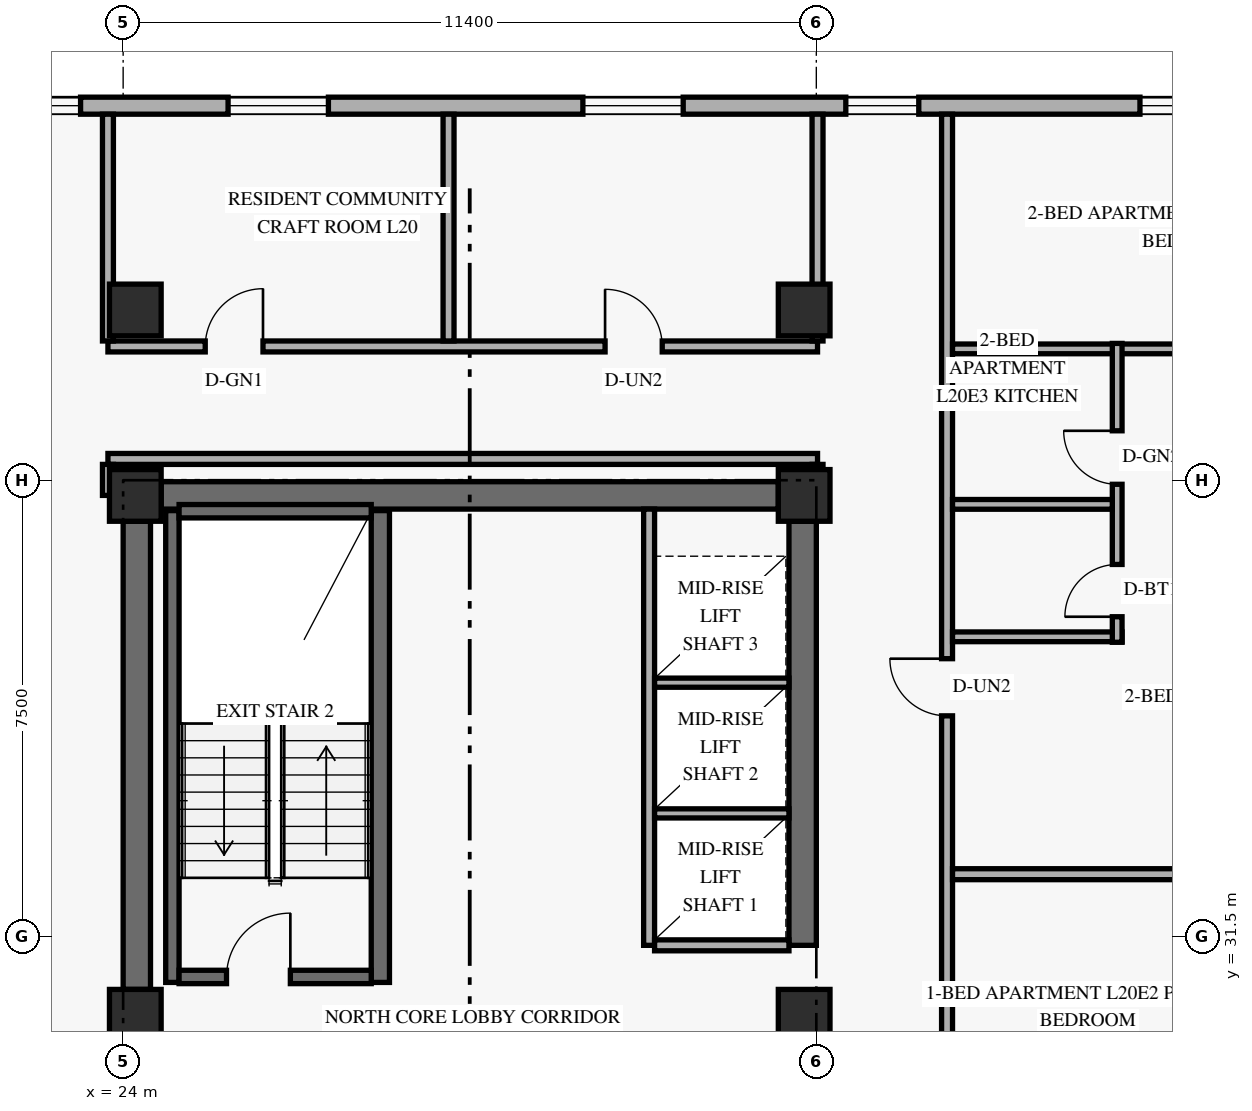
"""IFC4 building model, lengths in metres.
Left out: names, types, materials, properties, quantities, classifications, styles, units other than length and angle.
Written with IfcOpenShell. Run it as: python <this file> out.ifc"""

import sys

from ifc_helpers import new_model, si_unit, direction, frame, frame_2d, origin, origin_2d, place, context, subcontext, project, spatial, rectangle, extrude, element, fill, save


model = new_model("IFC4")
c1 = context("Model", 3, precision=1e-05, world=origin(), true_north=direction((0.0, 1.0)))
c2 = subcontext(c1, "Body", "Model", "MODEL_VIEW")
j1 = project(units=[si_unit("LENGTHUNIT", "METRE"), si_unit("PLANEANGLEUNIT", "RADIAN")], contexts=[c1])
p1 = place(None, origin())
s1 = spatial("IfcSite", under=j1, at=p1, CompositionType="ELEMENT")
p2 = place(p1, origin())
s2 = spatial("IfcBuilding", under=s1, at=p2, CompositionType="ELEMENT")
p3 = place(p2, frame((0.0, 0.0, 80.4)))
s3 = spatial("IfcBuildingStorey", under=s2, at=p3, CompositionType="ELEMENT", Elevation=80.4)
p4 = place(p3, frame((24.225, 30.625, 0.0), z_axis=(0.0, 0.0, 1.0), x_axis=(0.0, 1.0, 0.0)))
e1 = element("IfcWall", 1, at=p4, inside=s3, PredefinedType="SHEAR", context=c2, shape_type="SweptSolid", body=[
    extrude(rectangle(XDim=7.7, YDim=0.45, at=frame_2d((3.85, 0.0))), origin(), (0.0, 0.0, 1.0), 2.749),
])
p5 = place(p3, frame((35.175, 31.35, 0.0), z_axis=(0.0, 0.0, 1.0), x_axis=(0.0, 1.0, 0.0)))
e2 = element("IfcWall", 2, at=p5, inside=s3, PredefinedType="SHEAR", context=c2, shape_type="SweptSolid", body=[
    extrude(rectangle(XDim=6.975, YDim=0.45, at=frame_2d((3.487, 0.0))), origin(), (0.0, 0.0, 1.0), 2.749),
])
p6 = place(p3, frame((24.625, 38.75, 0.0), z_axis=(0.0, 0.0, 1.0), x_axis=(1.0, 0.0, 0.0)))
e3 = element("IfcWall", 3, at=p6, inside=s3, PredefinedType="SHEAR", context=c2, shape_type="SweptSolid", body=[
    extrude(rectangle(XDim=10.15, YDim=0.45, at=frame_2d((5.075, 0.0))), origin(), (0.0, 0.0, 1.0), 3.36),
])
p7 = place(p3, frame((24.81, 30.74, 0.0), z_axis=(0.0, 0.0, 1.0), x_axis=(0.0, 1.0, 0.0)))
e4 = element("IfcWall", 4, at=p7, inside=s3, PredefinedType="SHEAR", context=c2, shape_type="SweptSolid", body=[
    extrude(rectangle(XDim=7.76, YDim=0.22, at=frame_2d((3.88, 0.0))), origin(), (0.0, 0.0, 1.0), 3.36),
])
p8 = place(p3, frame((28.23, 30.74, 0.0), z_axis=(0.0, 0.0, 1.0), x_axis=(0.0, 1.0, 0.0)))
e5 = element("IfcWall", 5, at=p8, inside=s3, PredefinedType="SHEAR", context=c2, shape_type="SweptSolid", body=[
    extrude(rectangle(XDim=7.76, YDim=0.3, at=frame_2d((3.88, 0.0))), origin(), (0.0, 0.0, 1.0), 3.36),
])
p9 = place(p3, frame((24.92, 30.83, 0.0), z_axis=(0.0, 0.0, 1.0), x_axis=(1.0, 0.0, 0.0)))
e6 = element("IfcWall", 6, at=p9, inside=s3, PredefinedType="SHEAR", context=c2, shape_type="SweptSolid", body=[
    extrude(rectangle(XDim=3.16, YDim=0.22, at=frame_2d((1.58, 0.0))), origin(), (0.0, 0.0, 1.0), 3.36),
])
p10 = place(p9, frame((0.78, 0.0, 0.0)))
e7 = element("IfcOpeningElement", 7, at=p10, cuts=e6, PredefinedType="OPENING", context=c2, shape_type="SweptSolid", body=[
    extrude(rectangle(XDim=1.05, YDim=2.15, at=frame_2d((0.525, 1.075))), frame((0.0, 0.12, 0.0), z_axis=(0.0, -1.0, 0.0), x_axis=(1.0, 0.0, 0.0)), (0.0, 0.0, 1.0), 0.24),
])
p11 = place(p3, frame((24.92, 38.49, 0.0), z_axis=(0.0, 0.0, 1.0), x_axis=(1.0, 0.0, 0.0)))
e8 = element("IfcWall", 8, at=p11, inside=s3, PredefinedType="SHEAR", context=c2, shape_type="SweptSolid", body=[
    extrude(rectangle(XDim=3.16, YDim=0.22, at=frame_2d((1.58, 0.0))), origin(), (0.0, 0.0, 1.0), 3.36),
])
for number, where, z_axis, x_axis in (
    (9, (24.2, 30.2, 0.0), (0.0, 0.0, 1.0), (1.0, 0.0, 0.0)),
    (10, (24.2, 38.75, 0.0), (0.0, 0.0, 1.0), (1.0, 0.0, 0.0)),
    (11, (24.2, 41.8, 0.0), (0.0, 0.0, 1.0), (1.0, 0.0, 0.0)),
    (12, (35.2, 30.2, 0.0), (0.0, 0.0, 1.0), (1.0, 0.0, 0.0)),
    (13, (35.2, 38.75, 0.0), (0.0, 0.0, 1.0), (1.0, 0.0, 0.0)),
    (14, (35.2, 41.8, 0.0), (0.0, 0.0, 1.0), (1.0, 0.0, 0.0)),
):
    element("IfcColumn", number, at=place(p3, frame(where, z_axis=z_axis, x_axis=x_axis)), inside=s3, PredefinedType="COLUMN", context=c2, shape_type="SweptSolid", body=[
        extrude(rectangle(XDim=0.85, YDim=0.85, at=origin_2d()), origin(), (0.0, 0.0, 1.0), 3.6),
    ])
p12 = place(p3, frame((49.98, 45.16, 0.0), z_axis=(0.0, 0.0, 1.0), x_axis=(-1.0, 0.0, 0.0)))
e15 = element("IfcWall", 15, at=p12, inside=s3, PredefinedType="SOLIDWALL", context=c2, shape_type="SweptSolid", body=[
    extrude(rectangle(XDim=36.56, YDim=0.28, at=frame_2d((18.28, 0.0))), origin(), (0.0, 0.0, 1.0), 3.36),
])
p13 = place(p12, frame((30.99, 0.0, 0.85)))
e16 = element("IfcOpeningElement", 16, at=p13, cuts=e15, PredefinedType="OPENING", context=c2, shape_type="SweptSolid", body=[
    extrude(rectangle(XDim=1.65, YDim=1.6, at=frame_2d((0.825, 0.8))), frame((0.0, 0.15, 0.0), z_axis=(0.0, -1.0, 0.0), x_axis=(1.0, 0.0, 0.0)), (0.0, 0.0, 1.0), 0.3),
])
p14 = place(p12, frame((26.68, 0.0, 0.85)))
e17 = element("IfcOpeningElement", 17, at=p14, cuts=e15, PredefinedType="OPENING", context=c2, shape_type="SweptSolid", body=[
    extrude(rectangle(XDim=1.2, YDim=1.5, at=frame_2d((0.6, 0.75))), frame((0.0, 0.15, 0.0), z_axis=(0.0, -1.0, 0.0), x_axis=(1.0, 0.0, 0.0)), (0.0, 0.0, 1.0), 0.3),
])
p15 = place(p12, frame((22.604, 0.0, 0.85)))
e18 = element("IfcOpeningElement", 18, at=p15, cuts=e15, PredefinedType="OPENING", context=c2, shape_type="SweptSolid", body=[
    extrude(rectangle(XDim=1.65, YDim=1.6, at=frame_2d((0.825, 0.8))), frame((0.0, 0.15, 0.0), z_axis=(0.0, -1.0, 0.0), x_axis=(1.0, 0.0, 0.0)), (0.0, 0.0, 1.0), 0.3),
])
p16 = place(p12, frame((16.769, 0.0, 0.85)))
e19 = element("IfcOpeningElement", 19, at=p16, cuts=e15, PredefinedType="OPENING", context=c2, shape_type="SweptSolid", body=[
    extrude(rectangle(XDim=1.65, YDim=1.6, at=frame_2d((0.825, 0.8))), frame((0.0, 0.15, 0.0), z_axis=(0.0, -1.0, 0.0), x_axis=(1.0, 0.0, 0.0)), (0.0, 0.0, 1.0), 0.3),
])
p17 = place(p12, frame((12.895, 0.0, 0.85)))
e20 = element("IfcOpeningElement", 20, at=p17, cuts=e15, PredefinedType="OPENING", context=c2, shape_type="SweptSolid", body=[
    extrude(rectangle(XDim=1.2, YDim=1.5, at=frame_2d((0.6, 0.75))), frame((0.0, 0.15, 0.0), z_axis=(0.0, -1.0, 0.0), x_axis=(1.0, 0.0, 0.0)), (0.0, 0.0, 1.0), 0.3),
])
p18 = place(p12, frame((7.607, 0.0, 0.85)))
e21 = element("IfcOpeningElement", 21, at=p18, cuts=e15, PredefinedType="OPENING", context=c2, shape_type="SweptSolid", body=[
    extrude(rectangle(XDim=1.65, YDim=1.6, at=frame_2d((0.825, 0.8))), frame((0.0, 0.15, 0.0), z_axis=(0.0, -1.0, 0.0), x_axis=(1.0, 0.0, 0.0)), (0.0, 0.0, 1.0), 0.3),
])
p19 = place(p12, frame((1.393, 0.0, 0.85)))
e22 = element("IfcOpeningElement", 22, at=p19, cuts=e15, PredefinedType="OPENING", context=c2, shape_type="SweptSolid", body=[
    extrude(rectangle(XDim=1.65, YDim=1.6, at=frame_2d((0.825, 0.8))), frame((0.0, 0.15, 0.0), z_axis=(0.0, -1.0, 0.0), x_axis=(1.0, 0.0, 0.0)), (0.0, 0.0, 1.0), 0.3),
])
p20 = place(p3, frame((32.65, 31.35, 0.0), z_axis=(0.0, 0.0, 1.0), x_axis=(0.0, 1.0, 0.0)))
e23 = element("IfcWall", 23, at=p20, inside=s3, PredefinedType="STANDARD", context=c2, shape_type="SweptSolid", body=[
    extrude(rectangle(XDim=7.175, YDim=0.18, at=frame_2d((3.587, 0.0))), origin(), (0.0, 0.0, 1.0), 3.36),
])
p21 = place(p3, frame((32.74, 31.35, 0.0), z_axis=(0.0, 0.0, 1.0), x_axis=(1.0, 0.0, 0.0)))
e24 = element("IfcWall", 24, at=p21, inside=s3, PredefinedType="STANDARD", context=c2, shape_type="SweptSolid", body=[
    extrude(rectangle(XDim=2.21, YDim=0.18, at=frame_2d((1.105, 0.0))), origin(), (0.0, 0.0, 1.0), 3.36),
])
for number, where, z_axis, x_axis in (
    (25, (32.74, 33.52, 0.0), (0.0, 0.0, 1.0), (1.0, 0.0, 0.0)),
    (26, (32.74, 35.67, 0.0), (0.0, 0.0, 1.0), (1.0, 0.0, 0.0)),
):
    element("IfcWall", number, at=place(p3, frame(where, z_axis=z_axis, x_axis=x_axis)), inside=s3, PredefinedType="STANDARD", context=c2, shape_type="SweptSolid", body=[
        extrude(rectangle(XDim=2.21, YDim=0.15, at=frame_2d((1.105, 0.0))), origin(), (0.0, 0.0, 1.0), 3.36),
    ])
p22 = place(p3, frame((37.55, 2.98, 0.0), z_axis=(0.0, 0.0, 1.0), x_axis=(0.0, 1.0, 0.0)))
e27 = element("IfcWall", 27, at=p22, inside=s3, PredefinedType="STANDARD", context=c2, shape_type="SweptSolid", body=[
    extrude(rectangle(XDim=42.04, YDim=0.18, at=frame_2d((21.02, 0.0))), origin(), (0.0, 0.0, 1.0), 2.731),
])
p23 = place(p22, frame((8.69, 0.0, 0.0)))
e28 = element("IfcOpeningElement", 28, at=p23, cuts=e27, PredefinedType="OPENING", context=c2, shape_type="SweptSolid", body=[
    extrude(rectangle(XDim=0.94, YDim=2.15, at=frame_2d((0.47, 1.075))), frame((0.0, 0.1, 0.0), z_axis=(0.0, -1.0, 0.0), x_axis=(1.0, 0.0, 0.0)), (0.0, 0.0, 1.0), 0.2),
])
p24 = place(p22, frame((19.043, 0.0, 0.0)))
e29 = element("IfcOpeningElement", 29, at=p24, cuts=e27, PredefinedType="OPENING", context=c2, shape_type="SweptSolid", body=[
    extrude(rectangle(XDim=0.94, YDim=2.15, at=frame_2d((0.47, 1.075))), frame((0.0, 0.1, 0.0), z_axis=(0.0, -1.0, 0.0), x_axis=(1.0, 0.0, 0.0)), (0.0, 0.0, 1.0), 0.2),
])
p25 = place(p22, frame((32.145, 0.0, 0.0)))
e30 = element("IfcOpeningElement", 30, at=p25, cuts=e27, PredefinedType="OPENING", context=c2, shape_type="SweptSolid", body=[
    extrude(rectangle(XDim=0.94, YDim=2.15, at=frame_2d((0.47, 1.075))), frame((0.0, 0.1, 0.0), z_axis=(0.0, -1.0, 0.0), x_axis=(1.0, 0.0, 0.0)), (0.0, 0.0, 1.0), 0.2),
])
p26 = place(p3, frame((23.75, 41.2, 0.0), z_axis=(0.0, 0.0, 1.0), x_axis=(1.0, 0.0, 0.0)))
e31 = element("IfcWall", 31, at=p26, inside=s3, PredefinedType="STANDARD", context=c2, shape_type="SweptSolid", body=[
    extrude(rectangle(XDim=11.67, YDim=0.18, at=frame_2d((5.835, 0.0))), origin(), (0.0, 0.0, 1.0), 2.731),
])
p27 = place(p26, frame((1.6, 0.0, 0.0)))
e32 = element("IfcOpeningElement", 32, at=p27, cuts=e31, PredefinedType="OPENING", context=c2, shape_type="SweptSolid", body=[
    extrude(rectangle(XDim=0.95, YDim=2.15, at=frame_2d((0.475, 1.075))), frame((0.0, 0.1, 0.0), z_axis=(0.0, -1.0, 0.0), x_axis=(1.0, 0.0, 0.0)), (0.0, 0.0, 1.0), 0.2),
])
p28 = place(p26, frame((8.176, 0.0, 0.0)))
e33 = element("IfcOpeningElement", 33, at=p28, cuts=e31, PredefinedType="OPENING", context=c2, shape_type="SweptSolid", body=[
    extrude(rectangle(XDim=0.94, YDim=2.15, at=frame_2d((0.47, 1.075))), frame((0.0, 0.1, 0.0), z_axis=(0.0, -1.0, 0.0), x_axis=(1.0, 0.0, 0.0)), (0.0, 0.0, 1.0), 0.2),
])
p29 = place(p3, frame((23.75, 39.35, 0.0), z_axis=(0.0, 0.0, 1.0), x_axis=(1.0, 0.0, 0.0)))
e34 = element("IfcWall", 34, at=p29, inside=s3, PredefinedType="STANDARD", context=c2, shape_type="SweptSolid", body=[
    extrude(rectangle(XDim=11.67, YDim=0.18, at=frame_2d((5.835, 0.0))), origin(), (0.0, 0.0, 1.0), 2.731),
])
p30 = place(p3, frame((35.42, 38.75, 0.0), z_axis=(0.0, 0.0, 1.0), x_axis=(0.0, 1.0, 0.0)))
e35 = element("IfcWall", 35, at=p30, inside=s3, PredefinedType="STANDARD", context=c2, shape_type="SweptSolid", body=[
    extrude(rectangle(XDim=0.51, YDim=0.18, at=frame_2d((0.255, 0.0))), origin(), (0.0, 0.0, 1.0), 2.731),
])
p31 = place(p3, frame((35.42, 41.29, 0.0), z_axis=(0.0, 0.0, 1.0), x_axis=(0.0, 1.0, 0.0)))
e36 = element("IfcWall", 36, at=p31, inside=s3, PredefinedType="PARTITIONING", context=c2, shape_type="SweptSolid", body=[
    extrude(rectangle(XDim=3.73, YDim=0.18, at=frame_2d((1.865, 0.0))), origin(), (0.0, 0.0, 1.0), 2.731),
])
p32 = place(p3, frame((23.75, 38.75, 0.0), z_axis=(0.0, 0.0, 1.0), x_axis=(0.0, 1.0, 0.0)))
e37 = element("IfcWall", 37, at=p32, inside=s3, PredefinedType="STANDARD", context=c2, shape_type="SweptSolid", body=[
    extrude(rectangle(XDim=0.51, YDim=0.18, at=frame_2d((0.255, 0.0))), origin(), (0.0, 0.0, 1.0), 2.731),
])
p33 = place(p3, frame((37.64, 32.52, 0.0), z_axis=(0.0, 0.0, 1.0), x_axis=(1.0, 0.0, 0.0)))
e38 = element("IfcWall", 38, at=p33, inside=s3, PredefinedType="PARTITIONING", context=c2, shape_type="SweptSolid", body=[
    extrude(rectangle(XDim=15.68, YDim=0.18, at=frame_2d((7.84, 0.0))), origin(), (0.0, 0.0, 1.0), 2.731),
])
p34 = place(p3, frame((37.64, 41.16, 0.0), z_axis=(0.0, 0.0, 1.0), x_axis=(1.0, 0.0, 0.0)))
e39 = element("IfcWall", 39, at=p34, inside=s3, PredefinedType="PARTITIONING", context=c2, shape_type="SweptSolid", body=[
    extrude(rectangle(XDim=15.68, YDim=0.16, at=frame_2d((7.84, 0.0))), origin(), (0.0, 0.0, 1.0), 2.731),
])
p35 = place(p34, frame((5.751, 0.0, 0.0)))
e40 = element("IfcOpeningElement", 40, at=p35, cuts=e39, PredefinedType="OPENING", context=c2, shape_type="SweptSolid", body=[
    extrude(rectangle(XDim=0.88, YDim=2.14, at=frame_2d((0.44, 1.07))), frame((0.0, 0.09, 0.0), z_axis=(0.0, -1.0, 0.0), x_axis=(1.0, 0.0, 0.0)), (0.0, 0.0, 1.0), 0.18),
])
p36 = place(p34, frame((8.244, 0.0, 0.0)))
e41 = element("IfcOpeningElement", 41, at=p36, cuts=e39, PredefinedType="OPENING", context=c2, shape_type="SweptSolid", body=[
    extrude(rectangle(XDim=0.88, YDim=2.14, at=frame_2d((0.44, 1.07))), frame((0.0, 0.09, 0.0), z_axis=(0.0, -1.0, 0.0), x_axis=(1.0, 0.0, 0.0)), (0.0, 0.0, 1.0), 0.18),
])
p37 = place(p3, frame((37.64, 36.425, 0.0), z_axis=(0.0, 0.0, 1.0), x_axis=(1.0, 0.0, 0.0)))
e42 = element("IfcWall", 42, at=p37, inside=s3, PredefinedType="PLUMBINGWALL", context=c2, shape_type="SweptSolid", body=[
    extrude(rectangle(XDim=2.788, YDim=0.16, at=frame_2d((1.394, 0.0))), origin(), (0.0, 0.0, 1.0), 3.36),
])
p38 = place(p3, frame((40.348, 36.334, 0.0), z_axis=(0.0, 0.0, 1.0), x_axis=(0.0, 1.0, 0.0)))
e43 = element("IfcWall", 43, at=p38, inside=s3, PredefinedType="PLUMBINGWALL", context=c2, shape_type="SweptSolid", body=[
    extrude(rectangle(XDim=4.916, YDim=0.16, at=frame_2d((2.458, 0.0))), origin(), (0.0, 0.0, 1.0), 2.731),
])
p39 = place(p38, frame((0.42, 0.0, 0.0)))
e44 = element("IfcOpeningElement", 44, at=p39, cuts=e43, PredefinedType="OPENING", context=c2, shape_type="SweptSolid", body=[
    extrude(rectangle(XDim=0.86, YDim=2.12, at=frame_2d((0.43, 1.06))), frame((0.0, 0.09, 0.0), z_axis=(0.0, -1.0, 0.0), x_axis=(1.0, 0.0, 0.0)), (0.0, 0.0, 1.0), 0.18),
])
p40 = place(p38, frame((2.598, 0.0, 0.0)))
e45 = element("IfcOpeningElement", 45, at=p40, cuts=e43, PredefinedType="OPENING", context=c2, shape_type="SweptSolid", body=[
    extrude(rectangle(XDim=0.88, YDim=2.12, at=frame_2d((0.44, 1.06))), frame((0.0, 0.09, 0.0), z_axis=(0.0, -1.0, 0.0), x_axis=(1.0, 0.0, 0.0)), (0.0, 0.0, 1.0), 0.18),
])
p41 = place(p3, frame((37.64, 38.603, 0.0), z_axis=(0.0, 0.0, 1.0), x_axis=(1.0, 0.0, 0.0)))
e46 = element("IfcWall", 46, at=p41, inside=s3, PredefinedType="PLUMBINGWALL", context=c2, shape_type="SweptSolid", body=[
    extrude(rectangle(XDim=2.628, YDim=0.16, at=frame_2d((1.314, 0.0))), origin(), (0.0, 0.0, 1.0), 2.731),
])
for number, where, z_axis, x_axis in (
    (47, (23.75, 41.29, 0.0), (0.0, 0.0, 1.0), (0.0, 1.0, 0.0)),
    (48, (29.352, 41.29, 0.0), (0.0, 0.0, 1.0), (0.0, 1.0, 0.0)),
):
    element("IfcWall", number, at=place(p3, frame(where, z_axis=z_axis, x_axis=x_axis)), inside=s3, PredefinedType="PARTITIONING", context=c2, shape_type="SweptSolid", body=[
        extrude(rectangle(XDim=3.73, YDim=0.18, at=frame_2d((1.865, 0.0))), origin(), (0.0, 0.0, 1.0), 2.809),
    ])
p42 = place(p14, origin())
e49 = element("IfcWindow", 49, at=p42, inside=s3, PartitioningType="SINGLE_PANEL", PredefinedType="WINDOW", context=c2, shape_type="SweptSolid", body=[
    extrude(rectangle(XDim=1.2, YDim=1.5, at=frame_2d((0.6, 0.75))), frame((0.0, 0.03, 0.0), z_axis=(0.0, -1.0, 0.0), x_axis=(1.0, 0.0, 0.0)), (0.0, 0.0, 1.0), 0.06),
])
fill(e17, e49)
p43 = place(p15, origin())
e50 = element("IfcWindow", 50, at=p43, inside=s3, PartitioningType="SINGLE_PANEL", PredefinedType="WINDOW", context=c2, shape_type="SweptSolid", body=[
    extrude(rectangle(XDim=1.65, YDim=1.6, at=frame_2d((0.825, 0.8))), frame((0.0, 0.03, 0.0), z_axis=(0.0, -1.0, 0.0), x_axis=(1.0, 0.0, 0.0)), (0.0, 0.0, 1.0), 0.06),
])
fill(e18, e50)
p44 = place(p16, origin())
e51 = element("IfcWindow", 51, at=p44, inside=s3, PartitioningType="SINGLE_PANEL", PredefinedType="WINDOW", context=c2, shape_type="SweptSolid", body=[
    extrude(rectangle(XDim=1.65, YDim=1.6, at=frame_2d((0.825, 0.8))), frame((0.0, 0.03, 0.0), z_axis=(0.0, -1.0, 0.0), x_axis=(1.0, 0.0, 0.0)), (0.0, 0.0, 1.0), 0.06),
])
fill(e19, e51)
p45 = place(p17, origin())
e52 = element("IfcWindow", 52, at=p45, inside=s3, PartitioningType="SINGLE_PANEL", PredefinedType="WINDOW", context=c2, shape_type="SweptSolid", body=[
    extrude(rectangle(XDim=1.2, YDim=1.5, at=frame_2d((0.6, 0.75))), frame((0.0, 0.03, 0.0), z_axis=(0.0, -1.0, 0.0), x_axis=(1.0, 0.0, 0.0)), (0.0, 0.0, 1.0), 0.06),
])
fill(e20, e52)
p46 = place(p18, origin())
e53 = element("IfcWindow", 53, at=p46, inside=s3, PartitioningType="SINGLE_PANEL", PredefinedType="WINDOW", context=c2, shape_type="SweptSolid", body=[
    extrude(rectangle(XDim=1.65, YDim=1.6, at=frame_2d((0.825, 0.8))), frame((0.0, 0.03, 0.0), z_axis=(0.0, -1.0, 0.0), x_axis=(1.0, 0.0, 0.0)), (0.0, 0.0, 1.0), 0.06),
])
fill(e21, e53)
p47 = place(p10, origin())
e54 = element("IfcDoor", 54, at=p47, inside=s3, OperationType="SINGLE_SWING_RIGHT", PredefinedType="DOOR", context=c2, shape_type="SweptSolid", body=[
    extrude(rectangle(XDim=1.05, YDim=2.15, at=frame_2d((0.525, 1.075))), frame((0.0, 0.025, 0.0), z_axis=(0.0, -1.0, 0.0), x_axis=(1.0, 0.0, 0.0)), (0.0, 0.0, 1.0), 0.05),
])
fill(e7, e54)
p48 = place(p25, origin())
e55 = element("IfcDoor", 55, at=p48, inside=s3, OperationType="SINGLE_SWING_RIGHT", PredefinedType="DOOR", context=c2, shape_type="SweptSolid", body=[
    extrude(rectangle(XDim=0.94, YDim=2.15, at=frame_2d((0.47, 1.075))), frame((0.0, 0.025, 0.0), z_axis=(0.0, -1.0, 0.0), x_axis=(1.0, 0.0, 0.0)), (0.0, 0.0, 1.0), 0.05),
])
fill(e30, e55)
p49 = place(p39, origin())
e56 = element("IfcDoor", 56, at=p49, inside=s3, OperationType="SINGLE_SWING_LEFT", PredefinedType="DOOR", context=c2, shape_type="SweptSolid", body=[
    extrude(rectangle(XDim=0.86, YDim=2.12, at=frame_2d((0.43, 1.06))), frame((0.0, 0.025, 0.0), z_axis=(0.0, -1.0, 0.0), x_axis=(1.0, 0.0, 0.0)), (0.0, 0.0, 1.0), 0.05),
])
fill(e44, e56)
p50 = place(p40, origin())
e57 = element("IfcDoor", 57, at=p50, inside=s3, OperationType="SINGLE_SWING_RIGHT", PredefinedType="DOOR", context=c2, shape_type="SweptSolid", body=[
    extrude(rectangle(XDim=0.88, YDim=2.12, at=frame_2d((0.44, 1.06))), frame((0.0, 0.025, 0.0), z_axis=(0.0, -1.0, 0.0), x_axis=(1.0, 0.0, 0.0)), (0.0, 0.0, 1.0), 0.05),
])
fill(e45, e57)
p51 = place(p27, origin())
e58 = element("IfcDoor", 58, at=p51, inside=s3, OperationType="SINGLE_SWING_RIGHT", PredefinedType="DOOR", context=c2, shape_type="SweptSolid", body=[
    extrude(rectangle(XDim=0.95, YDim=2.15, at=frame_2d((0.475, 1.075))), frame((0.0, 0.025, 0.0), z_axis=(0.0, -1.0, 0.0), x_axis=(1.0, 0.0, 0.0)), (0.0, 0.0, 1.0), 0.05),
])
fill(e32, e58)
p52 = place(p28, origin())
e59 = element("IfcDoor", 59, at=p52, inside=s3, OperationType="SINGLE_SWING_LEFT", PredefinedType="DOOR", context=c2, shape_type="SweptSolid", body=[
    extrude(rectangle(XDim=0.94, YDim=2.15, at=frame_2d((0.47, 1.075))), frame((0.0, 0.025, 0.0), z_axis=(0.0, -1.0, 0.0), x_axis=(1.0, 0.0, 0.0)), (0.0, 0.0, 1.0), 0.05),
])
fill(e33, e59)
save(model, sys.argv[1])
